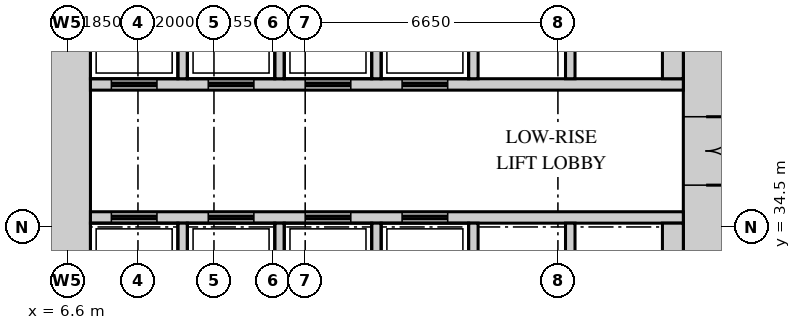
"""IFC4 building model, lengths in metres.
Left out: names, types, materials, properties, quantities, classifications, styles, units other than length and angle.
Written with IfcOpenShell. Run it as: python <this file> out.ifc"""

import sys

from ifc_helpers import new_model, si_unit, direction, frame, frame_2d, origin, place, context, subcontext, project, spatial, rectangle, extrude, source, transform, mapped, element, fill, save


model = new_model("IFC4")
c1 = context("Model", 3, precision=1e-05, world=origin(), true_north=direction((0.0, 1.0)))
c2 = subcontext(c1, "Body", "Model", "MODEL_VIEW")
j1 = project(units=[si_unit("LENGTHUNIT", "METRE"), si_unit("PLANEANGLEUNIT", "RADIAN")], contexts=[c1])
p1 = place(None, origin())
s1 = spatial("IfcSite", under=j1, at=p1, CompositionType="ELEMENT")
p2 = place(p1, origin())
s2 = spatial("IfcBuilding", under=s1, at=p2, CompositionType="ELEMENT")
p3 = place(p2, frame((0.0, 0.0, 23.5)))
s3 = spatial("IfcBuildingStorey", under=s2, at=p3, CompositionType="ELEMENT", Elevation=23.5)
m1 = source(origin(), c2, "Body", "SweptSolid", [
    extrude(rectangle(XDim=27.6, YDim=1.2, at=frame_2d((13.8, 0.0))), origin(), (0.0, 0.0, 1.0), 4.7),
])
p4 = place(p3, frame((23.4, 13.2, 0.0), z_axis=(0.0, 0.0, 1.0), x_axis=(0.0, 1.0, 0.0)))
e1 = element("IfcWall", 1, at=p4, inside=s3, PredefinedType="SHEAR", context=c2, shape_type="MappedRepresentation", body=[
    mapped(m1, transform((0.0, 0.0, 0.0))),
])
m2 = source(origin(), c2, "Body", "SweptSolid", [
    extrude(rectangle(XDim=1.8, YDim=2.1, at=frame_2d((0.9, 1.05))), frame((0.0, 0.61, 0.0), z_axis=(0.0, -1.0, 0.0), x_axis=(1.0, 0.0, 0.0)), (0.0, 0.0, 1.0), 1.22),
])
p5 = place(p4, frame((22.4, 0.0, 0.0)))
e2 = element("IfcOpeningElement", 2, at=p5, cuts=e1, PredefinedType="OPENING", context=c2, shape_type="MappedRepresentation", body=[
    mapped(m2, transform((0.0, 0.0, 0.0))),
])
m3 = source(origin(), c2, "Body", "SweptSolid", [
    extrude(rectangle(XDim=1.2, YDim=2.1, at=frame_2d((0.6, 1.05))), frame((0.0, 0.61, 0.0), z_axis=(0.0, -1.0, 0.0), x_axis=(1.0, 0.0, 0.0)), (0.0, 0.0, 1.0), 1.22),
])
p6 = place(p4, frame((12.9, 0.0, 0.0)))
e3 = element("IfcOpeningElement", 3, at=p6, cuts=e1, PredefinedType="OPENING", context=c2, shape_type="MappedRepresentation", body=[
    mapped(m3, transform((0.0, 0.0, 0.0))),
])
m4 = source(origin(), c2, "Body", "SweptSolid", [
    extrude(rectangle(XDim=0.9, YDim=2.1, at=frame_2d((0.45, 1.05))), frame((0.0, 0.61, 0.0), z_axis=(0.0, -1.0, 0.0), x_axis=(1.0, 0.0, 0.0)), (0.0, 0.0, 1.0), 1.22),
])
p7 = place(p4, frame((2.0, 0.0, 0.0)))
e4 = element("IfcOpeningElement", 4, at=p7, cuts=e1, PredefinedType="OPENING", context=c2, shape_type="MappedRepresentation", body=[
    mapped(m4, transform((0.0, 0.0, 0.0))),
])
p8 = place(p4, frame((6.85, 0.0, 0.0)))
e5 = element("IfcOpeningElement", 5, at=p8, cuts=e1, PredefinedType="OPENING", context=c2, shape_type="MappedRepresentation", body=[
    mapped(m4, transform((0.0, 0.0, 0.0))),
])
p9 = place(p3, frame((6.6, 13.2, 0.0), z_axis=(0.0, 0.0, 1.0), x_axis=(0.0, 1.0, 0.0)))
e6 = element("IfcWall", 6, at=p9, inside=s3, PredefinedType="SHEAR", context=c2, shape_type="MappedRepresentation", body=[
    mapped(m1, transform((0.0, 0.0, 0.0))),
])
m5 = source(origin(), c2, "Body", "SweptSolid", [
    extrude(rectangle(XDim=15.6, YDim=0.3, at=frame_2d((7.8, 0.0))), origin(), (0.0, 0.0, 1.0), 4.7),
])
p10 = place(p3, frame((7.2, 38.25, 0.0), z_axis=(0.0, 0.0, 1.0), x_axis=(1.0, 0.0, 0.0)))
e7 = element("IfcWall", 7, at=p10, inside=s3, PredefinedType="STANDARD", context=c2, shape_type="MappedRepresentation", body=[
    mapped(m5, transform((0.0, 0.0, 0.0))),
])
m6 = source(origin(), c2, "Body", "SweptSolid", [
    extrude(rectangle(XDim=1.2, YDim=2.1, at=frame_2d((0.6, 1.05))), frame((0.0, 0.16, 0.0), z_axis=(0.0, -1.0, 0.0), x_axis=(1.0, 0.0, 0.0)), (0.0, 0.0, 1.0), 0.32),
])
p11 = place(p10, frame((0.55, 0.0, 0.0)))
e8 = element("IfcOpeningElement", 8, at=p11, cuts=e7, PredefinedType="OPENING", context=c2, shape_type="MappedRepresentation", body=[
    mapped(m6, transform((0.0, 0.0, 0.0))),
])
p12 = place(p10, frame((3.1, 0.0, 0.0)))
e9 = element("IfcOpeningElement", 9, at=p12, cuts=e7, PredefinedType="OPENING", context=c2, shape_type="MappedRepresentation", body=[
    mapped(m6, transform((0.0, 0.0, 0.0))),
])
p13 = place(p10, frame((5.65, 0.0, 0.0)))
e10 = element("IfcOpeningElement", 10, at=p13, cuts=e7, PredefinedType="OPENING", context=c2, shape_type="MappedRepresentation", body=[
    mapped(m6, transform((0.0, 0.0, 0.0))),
])
p14 = place(p10, frame((8.2, 0.0, 0.0)))
e11 = element("IfcOpeningElement", 11, at=p14, cuts=e7, PredefinedType="OPENING", context=c2, shape_type="MappedRepresentation", body=[
    mapped(m6, transform((0.0, 0.0, 0.0))),
])
p15 = place(p3, frame((7.2, 34.75, 0.0), z_axis=(0.0, 0.0, 1.0), x_axis=(1.0, 0.0, 0.0)))
e12 = element("IfcWall", 12, at=p15, inside=s3, PredefinedType="STANDARD", context=c2, shape_type="MappedRepresentation", body=[
    mapped(m5, transform((0.0, 0.0, 0.0))),
])
p16 = place(p15, frame((0.55, 0.0, 0.0)))
e13 = element("IfcOpeningElement", 13, at=p16, cuts=e12, PredefinedType="OPENING", context=c2, shape_type="MappedRepresentation", body=[
    mapped(m6, transform((0.0, 0.0, 0.0))),
])
p17 = place(p15, frame((3.1, 0.0, 0.0)))
e14 = element("IfcOpeningElement", 14, at=p17, cuts=e12, PredefinedType="OPENING", context=c2, shape_type="MappedRepresentation", body=[
    mapped(m6, transform((0.0, 0.0, 0.0))),
])
p18 = place(p15, frame((5.65, 0.0, 0.0)))
e15 = element("IfcOpeningElement", 15, at=p18, cuts=e12, PredefinedType="OPENING", context=c2, shape_type="MappedRepresentation", body=[
    mapped(m6, transform((0.0, 0.0, 0.0))),
])
p19 = place(p15, frame((8.2, 0.0, 0.0)))
e16 = element("IfcOpeningElement", 16, at=p19, cuts=e12, PredefinedType="OPENING", context=c2, shape_type="MappedRepresentation", body=[
    mapped(m6, transform((0.0, 0.0, 0.0))),
])
m7 = source(origin(), c2, "Body", "SweptSolid", [
    extrude(rectangle(XDim=2.4, YDim=0.25, at=frame_2d((1.2, 0.0))), origin(), (0.0, 0.0, 1.0), 4.7),
])
for number, where, z_axis, x_axis in (
    (17, (9.625, 38.4, 0.0), (0.0, 0.0, 1.0), (0.0, 1.0, 0.0)),
    (18, (12.175, 38.4, 0.0), (0.0, 0.0, 1.0), (0.0, 1.0, 0.0)),
    (19, (14.725, 38.4, 0.0), (0.0, 0.0, 1.0), (0.0, 1.0, 0.0)),
    (20, (17.275, 38.4, 0.0), (0.0, 0.0, 1.0), (0.0, 1.0, 0.0)),
    (21, (19.825, 38.4, 0.0), (0.0, 0.0, 1.0), (0.0, 1.0, 0.0)),
):
    element("IfcWall", number, at=place(p3, frame(where, z_axis=z_axis, x_axis=x_axis)), inside=s3, PredefinedType="STANDARD", context=c2, shape_type="MappedRepresentation", body=[
        mapped(m7, transform((0.0, 0.0, 0.0))),
    ])
m8 = source(origin(), c2, "Body", "SweptSolid", [
    extrude(rectangle(XDim=2.4, YDim=0.55, at=frame_2d((1.2, 0.0))), origin(), (0.0, 0.0, 1.0), 4.7),
])
p20 = place(p3, frame((22.525, 38.4, 0.0), z_axis=(0.0, 0.0, 1.0), x_axis=(0.0, 1.0, 0.0)))
e22 = element("IfcWall", 22, at=p20, inside=s3, PredefinedType="STANDARD", context=c2, shape_type="MappedRepresentation", body=[
    mapped(m8, transform((0.0, 0.0, 0.0))),
])
for number, where, z_axis, x_axis in (
    (23, (9.625, 32.2, 0.0), (0.0, 0.0, 1.0), (0.0, 1.0, 0.0)),
    (24, (12.175, 32.2, 0.0), (0.0, 0.0, 1.0), (0.0, 1.0, 0.0)),
    (25, (14.725, 32.2, 0.0), (0.0, 0.0, 1.0), (0.0, 1.0, 0.0)),
    (26, (17.275, 32.2, 0.0), (0.0, 0.0, 1.0), (0.0, 1.0, 0.0)),
    (27, (19.825, 32.2, 0.0), (0.0, 0.0, 1.0), (0.0, 1.0, 0.0)),
):
    element("IfcWall", number, at=place(p3, frame(where, z_axis=z_axis, x_axis=x_axis)), inside=s3, PredefinedType="STANDARD", context=c2, shape_type="MappedRepresentation", body=[
        mapped(m7, transform((0.0, 0.0, 0.0))),
    ])
p21 = place(p3, frame((22.525, 32.2, 0.0), z_axis=(0.0, 0.0, 1.0), x_axis=(0.0, 1.0, 0.0)))
e28 = element("IfcWall", 28, at=p21, inside=s3, PredefinedType="STANDARD", context=c2, shape_type="MappedRepresentation", body=[
    mapped(m8, transform((0.0, 0.0, 0.0))),
])
m9 = source(origin(), c2, "Body", "SweptSolid", [
    extrude(rectangle(XDim=1.8, YDim=2.1, at=frame_2d((0.9, 1.05))), frame((0.0, 0.55, 0.0), z_axis=(0.0, -1.0, 0.0), x_axis=(1.0, 0.0, 0.0)), (0.0, 0.0, 1.0), 1.1),
])
p22 = place(p5, origin())
e29 = element("IfcDoor", 29, at=p22, inside=s3, OperationType="DOUBLE_DOOR_SINGLE_SWING", PredefinedType="DOOR", context=c2, shape_type="MappedRepresentation", body=[
    mapped(m9, transform((0.0, 0.0, 0.0))),
])
fill(e2, e29)
m10 = source(origin(), c2, "Body", "SweptSolid", [
    extrude(rectangle(XDim=1.2, YDim=2.1, at=frame_2d((0.6, 1.05))), frame((0.0, 0.025, 0.0), z_axis=(0.0, -1.0, 0.0), x_axis=(1.0, 0.0, 0.0)), (0.0, 0.0, 1.0), 0.05),
])
p23 = place(p16, origin())
e30 = element("IfcDoor", 30, at=p23, inside=s3, OperationType="DOUBLE_DOOR_SLIDING", PredefinedType="DOOR", context=c2, shape_type="MappedRepresentation", body=[
    mapped(m10, transform((0.0, 0.0, 0.0))),
])
fill(e13, e30)
p24 = place(p17, origin())
e31 = element("IfcDoor", 31, at=p24, inside=s3, OperationType="DOUBLE_DOOR_SLIDING", PredefinedType="DOOR", context=c2, shape_type="MappedRepresentation", body=[
    mapped(m10, transform((0.0, 0.0, 0.0))),
])
fill(e14, e31)
p25 = place(p18, origin())
e32 = element("IfcDoor", 32, at=p25, inside=s3, OperationType="DOUBLE_DOOR_SLIDING", PredefinedType="DOOR", context=c2, shape_type="MappedRepresentation", body=[
    mapped(m10, transform((0.0, 0.0, 0.0))),
])
fill(e15, e32)
p26 = place(p19, origin())
e33 = element("IfcDoor", 33, at=p26, inside=s3, OperationType="DOUBLE_DOOR_SLIDING", PredefinedType="DOOR", context=c2, shape_type="MappedRepresentation", body=[
    mapped(m10, transform((0.0, 0.0, 0.0))),
])
fill(e16, e33)
p27 = place(p11, origin())
e34 = element("IfcDoor", 34, at=p27, inside=s3, OperationType="DOUBLE_DOOR_SLIDING", PredefinedType="DOOR", context=c2, shape_type="MappedRepresentation", body=[
    mapped(m10, transform((0.0, 0.0, 0.0))),
])
fill(e8, e34)
p28 = place(p12, origin())
e35 = element("IfcDoor", 35, at=p28, inside=s3, OperationType="DOUBLE_DOOR_SLIDING", PredefinedType="DOOR", context=c2, shape_type="MappedRepresentation", body=[
    mapped(m10, transform((0.0, 0.0, 0.0))),
])
fill(e9, e35)
p29 = place(p13, origin())
e36 = element("IfcDoor", 36, at=p29, inside=s3, OperationType="DOUBLE_DOOR_SLIDING", PredefinedType="DOOR", context=c2, shape_type="MappedRepresentation", body=[
    mapped(m10, transform((0.0, 0.0, 0.0))),
])
fill(e10, e36)
p30 = place(p14, origin())
e37 = element("IfcDoor", 37, at=p30, inside=s3, OperationType="DOUBLE_DOOR_SLIDING", PredefinedType="DOOR", context=c2, shape_type="MappedRepresentation", body=[
    mapped(m10, transform((0.0, 0.0, 0.0))),
])
fill(e11, e37)
save(model, sys.argv[1])
